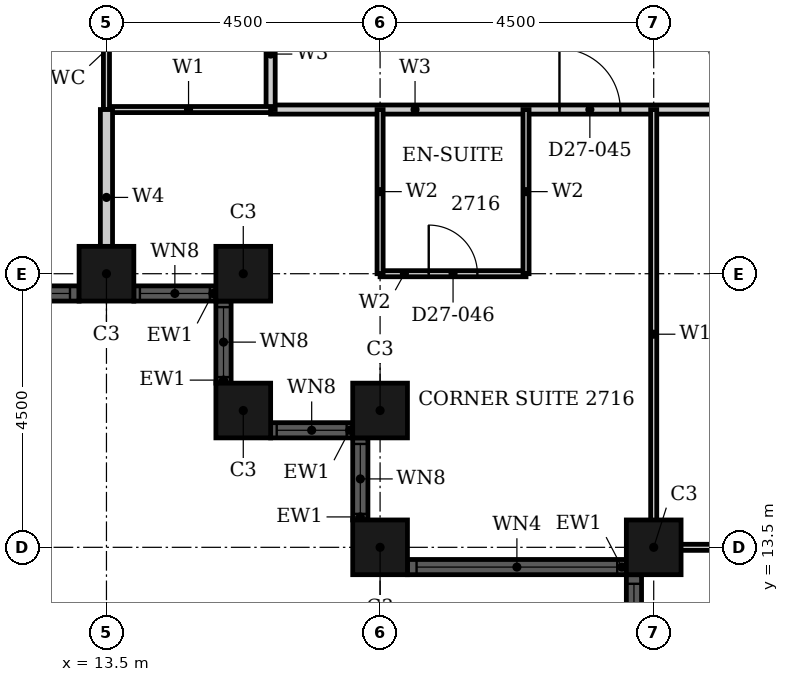
"""IFC4 building model, lengths in metres.
Left out: names, types, materials, properties, quantities, classifications, styles, units other than length and angle.
Written with IfcOpenShell. Run it as: python <this file> out.ifc"""

import sys

from ifc_helpers import new_model, si_unit, direction, frame, frame_2d, origin, origin_2d, place, context, subcontext, project, spatial, rectangle, hollow_rectangle, extrude, element, fill, save


model = new_model("IFC4")
c1 = context("Model", 3, precision=1e-05, world=origin(), true_north=direction((0.0, 1.0)))
c2 = subcontext(c1, "Body", "Model", "MODEL_VIEW")
j1 = project(units=[si_unit("LENGTHUNIT", "METRE"), si_unit("PLANEANGLEUNIT", "RADIAN")], contexts=[c1])
p1 = place(None, origin())
s1 = spatial("IfcSite", under=j1, at=p1, CompositionType="ELEMENT")
p2 = place(p1, origin())
s2 = spatial("IfcBuilding", under=s1, at=p2, CompositionType="ELEMENT")
p3 = place(p2, frame((0.0, 0.0, 111.6)))
s3 = spatial("IfcBuildingStorey", under=s2, at=p3, CompositionType="ELEMENT", Elevation=111.6)
for number, where, z_axis, x_axis in (
    (1, (13.5, 18.0, 0.0), (0.0, 0.0, 1.0), (1.0, 0.0, 0.0)),
    (2, (15.75, 18.0, 0.0), (0.0, 0.0, 1.0), (1.0, 0.0, 0.0)),
    (3, (15.75, 15.75, 0.0), (0.0, 0.0, 1.0), (1.0, 0.0, 0.0)),
    (4, (18.0, 15.75, 0.0), (0.0, 0.0, 1.0), (1.0, 0.0, 0.0)),
    (5, (18.0, 13.5, 0.0), (0.0, 0.0, 1.0), (1.0, 0.0, 0.0)),
    (6, (22.5, 13.5, 0.0), (0.0, 0.0, 1.0), (1.0, 0.0, 0.0)),
):
    element("IfcColumn", number, at=place(p3, frame(where, z_axis=z_axis, x_axis=x_axis)), inside=s3, PredefinedType="COLUMN", context=c2, shape_type="SweptSolid", body=[
        extrude(hollow_rectangle(XDim=0.9, YDim=0.9, WallThickness=0.028, at=origin_2d()), origin(), (0.0, 0.0, 1.0), 3.6),
    ])
p4 = place(p3, frame((4.95, 17.675, 0.0), z_axis=(0.0, 0.0, 1.0), x_axis=(1.0, 0.0, 0.0)))
e7 = element("IfcWall", 7, at=p4, inside=s3, PredefinedType="SOLIDWALL", context=c2, shape_type="SweptSolid", body=[
    extrude(rectangle(XDim=8.1, YDim=0.25, at=frame_2d((4.05, 0.0))), origin(), (0.0, 0.0, 1.0), 3.6),
])
p5 = place(p4, frame((0.15, 0.0, 0.9)))
e8 = element("IfcOpeningElement", 8, at=p5, cuts=e7, PredefinedType="OPENING", context=c2, shape_type="SweptSolid", body=[
    extrude(rectangle(XDim=3.3, YDim=2.08, at=frame_2d((1.65, 1.04))), frame((0.0, 0.135, 0.0), z_axis=(0.0, -1.0, 0.0), x_axis=(1.0, 0.0, 0.0)), (0.0, 0.0, 1.0), 0.27),
])
p6 = place(p4, frame((4.65, 0.0, 0.9)))
e9 = element("IfcOpeningElement", 9, at=p6, cuts=e7, PredefinedType="OPENING", context=c2, shape_type="SweptSolid", body=[
    extrude(rectangle(XDim=3.3, YDim=2.08, at=frame_2d((1.65, 1.04))), frame((0.0, 0.135, 0.0), z_axis=(0.0, -1.0, 0.0), x_axis=(1.0, 0.0, 0.0)), (0.0, 0.0, 1.0), 0.27),
])
p7 = place(p3, frame((13.95, 17.675, 0.0), z_axis=(0.0, 0.0, 1.0), x_axis=(1.0, 0.0, 0.0)))
e10 = element("IfcWall", 10, at=p7, inside=s3, PredefinedType="SOLIDWALL", context=c2, shape_type="SweptSolid", body=[
    extrude(rectangle(XDim=1.35, YDim=0.25, at=frame_2d((0.675, 0.0))), origin(), (0.0, 0.0, 1.0), 3.6),
])
p8 = place(p7, frame((0.1, 0.0, 0.9)))
e11 = element("IfcOpeningElement", 11, at=p8, cuts=e10, PredefinedType="OPENING", context=c2, shape_type="SweptSolid", body=[
    extrude(rectangle(XDim=1.15, YDim=2.08, at=frame_2d((0.575, 1.04))), frame((0.0, 0.135, 0.0), z_axis=(0.0, -1.0, 0.0), x_axis=(1.0, 0.0, 0.0)), (0.0, 0.0, 1.0), 0.27),
])
p9 = place(p3, frame((15.425, 17.55, 0.0), z_axis=(0.0, 0.0, 1.0), x_axis=(0.0, -1.0, 0.0)))
e12 = element("IfcWall", 12, at=p9, inside=s3, PredefinedType="SOLIDWALL", context=c2, shape_type="SweptSolid", body=[
    extrude(rectangle(XDim=1.35, YDim=0.25, at=frame_2d((0.675, 0.0))), origin(), (0.0, 0.0, 1.0), 3.6),
])
p10 = place(p9, frame((0.1, 0.0, 0.9)))
e13 = element("IfcOpeningElement", 13, at=p10, cuts=e12, PredefinedType="OPENING", context=c2, shape_type="SweptSolid", body=[
    extrude(rectangle(XDim=1.15, YDim=2.08, at=frame_2d((0.575, 1.04))), frame((0.0, 0.135, 0.0), z_axis=(0.0, -1.0, 0.0), x_axis=(1.0, 0.0, 0.0)), (0.0, 0.0, 1.0), 0.27),
])
p11 = place(p3, frame((16.2, 15.425, 0.0), z_axis=(0.0, 0.0, 1.0), x_axis=(1.0, 0.0, 0.0)))
e14 = element("IfcWall", 14, at=p11, inside=s3, PredefinedType="SOLIDWALL", context=c2, shape_type="SweptSolid", body=[
    extrude(rectangle(XDim=1.35, YDim=0.25, at=frame_2d((0.675, 0.0))), origin(), (0.0, 0.0, 1.0), 3.6),
])
p12 = place(p11, frame((0.1, 0.0, 0.9)))
e15 = element("IfcOpeningElement", 15, at=p12, cuts=e14, PredefinedType="OPENING", context=c2, shape_type="SweptSolid", body=[
    extrude(rectangle(XDim=1.15, YDim=2.08, at=frame_2d((0.575, 1.04))), frame((0.0, 0.135, 0.0), z_axis=(0.0, -1.0, 0.0), x_axis=(1.0, 0.0, 0.0)), (0.0, 0.0, 1.0), 0.27),
])
p13 = place(p3, frame((17.675, 15.3, 0.0), z_axis=(0.0, 0.0, 1.0), x_axis=(0.0, -1.0, 0.0)))
e16 = element("IfcWall", 16, at=p13, inside=s3, PredefinedType="SOLIDWALL", context=c2, shape_type="SweptSolid", body=[
    extrude(rectangle(XDim=1.35, YDim=0.25, at=frame_2d((0.675, 0.0))), origin(), (0.0, 0.0, 1.0), 3.6),
])
p14 = place(p13, frame((0.1, 0.0, 0.9)))
e17 = element("IfcOpeningElement", 17, at=p14, cuts=e16, PredefinedType="OPENING", context=c2, shape_type="SweptSolid", body=[
    extrude(rectangle(XDim=1.15, YDim=2.08, at=frame_2d((0.575, 1.04))), frame((0.0, 0.135, 0.0), z_axis=(0.0, -1.0, 0.0), x_axis=(1.0, 0.0, 0.0)), (0.0, 0.0, 1.0), 0.27),
])
p15 = place(p3, frame((18.45, 13.175, 0.0), z_axis=(0.0, 0.0, 1.0), x_axis=(1.0, 0.0, 0.0)))
e18 = element("IfcWall", 18, at=p15, inside=s3, PredefinedType="SOLIDWALL", context=c2, shape_type="SweptSolid", body=[
    extrude(rectangle(XDim=3.6, YDim=0.25, at=frame_2d((1.8, 0.0))), origin(), (0.0, 0.0, 1.0), 3.6),
])
p16 = place(p15, frame((0.15, 0.0, 0.9)))
e19 = element("IfcOpeningElement", 19, at=p16, cuts=e18, PredefinedType="OPENING", context=c2, shape_type="SweptSolid", body=[
    extrude(rectangle(XDim=3.3, YDim=2.08, at=frame_2d((1.65, 1.04))), frame((0.0, 0.135, 0.0), z_axis=(0.0, -1.0, 0.0), x_axis=(1.0, 0.0, 0.0)), (0.0, 0.0, 1.0), 0.27),
])
p17 = place(p3, frame((22.175, 13.05, 0.0), z_axis=(0.0, 0.0, 1.0), x_axis=(0.0, -1.0, 0.0)))
e20 = element("IfcWall", 20, at=p17, inside=s3, PredefinedType="SOLIDWALL", context=c2, shape_type="SweptSolid", body=[
    extrude(rectangle(XDim=8.1, YDim=0.25, at=frame_2d((4.05, 0.0))), origin(), (0.0, 0.0, 1.0), 3.6),
])
p18 = place(p17, frame((0.15, 0.0, 0.9)))
e21 = element("IfcOpeningElement", 21, at=p18, cuts=e20, PredefinedType="OPENING", context=c2, shape_type="SweptSolid", body=[
    extrude(rectangle(XDim=3.3, YDim=2.08, at=frame_2d((1.65, 1.04))), frame((0.0, 0.135, 0.0), z_axis=(0.0, -1.0, 0.0), x_axis=(1.0, 0.0, 0.0)), (0.0, 0.0, 1.0), 0.27),
])
p19 = place(p17, frame((4.65, 0.0, 0.9)))
e22 = element("IfcOpeningElement", 22, at=p19, cuts=e20, PredefinedType="OPENING", context=c2, shape_type="SweptSolid", body=[
    extrude(rectangle(XDim=3.3, YDim=2.08, at=frame_2d((1.65, 1.04))), frame((0.0, 0.135, 0.0), z_axis=(0.0, -1.0, 0.0), x_axis=(1.0, 0.0, 0.0)), (0.0, 0.0, 1.0), 0.27),
])
p20 = place(p3, frame((16.2, 20.7, 0.0), z_axis=(0.0, 0.0, 1.0), x_axis=(1.0, 0.0, 0.0)))
e23 = element("IfcWall", 23, at=p20, inside=s3, PredefinedType="PARTITIONING", context=c2, shape_type="SweptSolid", body=[
    extrude(rectangle(XDim=13.5, YDim=0.15, at=frame_2d((6.75, 0.0))), origin(), (0.0, 0.0, 1.0), 3.3),
])
p21 = place(p20, frame((4.75, 0.0, 0.0)))
e24 = element("IfcOpeningElement", 24, at=p21, cuts=e23, PredefinedType="OPENING", context=c2, shape_type="SweptSolid", body=[
    extrude(rectangle(XDim=1.0, YDim=2.1, at=frame_2d((0.5, 1.05))), frame((0.0, 0.085, 0.0), z_axis=(0.0, -1.0, 0.0), x_axis=(1.0, 0.0, 0.0)), (0.0, 0.0, 1.0), 0.17),
])
p22 = place(p20, frame((9.45, 0.0, 0.0)))
e25 = element("IfcOpeningElement", 25, at=p22, cuts=e23, PredefinedType="OPENING", context=c2, shape_type="SweptSolid", body=[
    extrude(rectangle(XDim=0.9, YDim=2.1, at=frame_2d((0.45, 1.05))), frame((0.0, 0.085, 0.0), z_axis=(0.0, -1.0, 0.0), x_axis=(1.0, 0.0, 0.0)), (0.0, 0.0, 1.0), 0.17),
])
p23 = place(p3, frame((16.2, 20.7, 0.0), z_axis=(0.0, 0.0, 1.0), x_axis=(0.0, 1.0, 0.0)))
e26 = element("IfcWall", 26, at=p23, inside=s3, PredefinedType="PARTITIONING", context=c2, shape_type="SweptSolid", body=[
    extrude(rectangle(XDim=4.5, YDim=0.15, at=frame_2d((2.25, 0.0))), origin(), (0.0, 0.0, 1.0), 3.3),
])
p24 = place(p23, frame((1.825, 0.0, 0.0)))
e27 = element("IfcOpeningElement", 27, at=p24, cuts=e26, PredefinedType="OPENING", context=c2, shape_type="SweptSolid", body=[
    extrude(rectangle(XDim=0.95, YDim=2.1, at=frame_2d((0.475, 1.05))), frame((0.0, 0.085, 0.0), z_axis=(0.0, -1.0, 0.0), x_axis=(1.0, 0.0, 0.0)), (0.0, 0.0, 1.0), 0.17),
])
p25 = place(p3, frame((22.31, 13.5, 0.0), z_axis=(0.0, 0.0, 1.0), x_axis=(1.0, 0.0, 0.0)))
e28 = element("IfcWall", 28, at=p25, inside=s3, PredefinedType="PARTITIONING", context=c2, shape_type="SweptSolid", body=[
    extrude(rectangle(XDim=7.39, YDim=0.1, at=frame_2d((3.695, 0.0))), origin(), (0.0, 0.0, 1.0), 2.38),
])
p26 = place(p3, frame((13.5, 20.7, 0.0), z_axis=(0.0, 0.0, 1.0), x_axis=(1.0, 0.0, 0.0)))
e29 = element("IfcWall", 29, at=p26, inside=s3, PredefinedType="PARTITIONING", context=c2, shape_type="SweptSolid", body=[
    extrude(rectangle(XDim=2.7, YDim=0.1, at=frame_2d((1.35, 0.0))), origin(), (0.0, 0.0, 1.0), 3.3),
])
p27 = place(p3, frame((13.5, 20.7, 0.0), z_axis=(0.0, 0.0, 1.0), x_axis=(0.0, 1.0, 0.0)))
e30 = element("IfcWall", 30, at=p27, inside=s3, PredefinedType="PARTITIONING", context=c2, shape_type="SweptSolid", body=[
    extrude(rectangle(XDim=4.5, YDim=0.1, at=frame_2d((2.25, 0.0))), origin(), (0.0, 0.0, 1.0), 2.38),
])
p28 = place(p3, frame((22.5, 13.31, 0.0), z_axis=(0.0, 0.0, 1.0), x_axis=(0.0, 1.0, 0.0)))
e31 = element("IfcWall", 31, at=p28, inside=s3, PredefinedType="PARTITIONING", context=c2, shape_type="SweptSolid", body=[
    extrude(rectangle(XDim=7.39, YDim=0.1, at=frame_2d((3.695, 0.0))), origin(), (0.0, 0.0, 1.0), 3.3),
])
p29 = place(p3, frame((13.5, 17.81, 0.0), z_axis=(0.0, 0.0, 1.0), x_axis=(0.0, 1.0, 0.0)))
e32 = element("IfcWall", 32, at=p29, inside=s3, PredefinedType="PARTITIONING", context=c2, shape_type="SweptSolid", body=[
    extrude(rectangle(XDim=2.89, YDim=0.2, at=frame_2d((1.445, 0.0))), origin(), (0.0, 0.0, 1.0), 2.38),
])
p30 = place(p3, frame((18.0, 18.0, 0.0), z_axis=(0.0, 0.0, 1.0), x_axis=(1.0, 0.0, 0.0)))
e33 = element("IfcWall", 33, at=p30, inside=s3, PredefinedType="PARTITIONING", context=c2, shape_type="SweptSolid", body=[
    extrude(rectangle(XDim=2.4, YDim=0.1, at=frame_2d((1.2, 0.0))), origin(), (0.0, 0.0, 1.0), 3.3),
])
p31 = place(p30, frame((0.8, 0.0, 0.0)))
e34 = element("IfcOpeningElement", 34, at=p31, cuts=e33, PredefinedType="OPENING", context=c2, shape_type="SweptSolid", body=[
    extrude(rectangle(XDim=0.8, YDim=2.1, at=frame_2d((0.4, 1.05))), frame((0.0, 0.06, 0.0), z_axis=(0.0, -1.0, 0.0), x_axis=(1.0, 0.0, 0.0)), (0.0, 0.0, 1.0), 0.12),
])
for number, where, z_axis, x_axis in (
    (35, (18.0, 18.0, 0.0), (0.0, 0.0, 1.0), (0.0, 1.0, 0.0)),
    (36, (20.4, 18.0, 0.0), (0.0, 0.0, 1.0), (0.0, 1.0, 0.0)),
):
    element("IfcWall", number, at=place(p3, frame(where, z_axis=z_axis, x_axis=x_axis)), inside=s3, PredefinedType="PARTITIONING", context=c2, shape_type="SweptSolid", body=[
        extrude(rectangle(XDim=2.7, YDim=0.1, at=frame_2d((1.35, 0.0))), origin(), (0.0, 0.0, 1.0), 3.3),
    ])
p32 = place(p6, origin())
e37 = element("IfcWindow", 37, at=p32, inside=s3, PartitioningType="SINGLE_PANEL", PredefinedType="WINDOW", context=c2, shape_type="SweptSolid", body=[
    extrude(rectangle(XDim=3.3, YDim=2.08, at=frame_2d((1.65, 1.04))), frame((0.0, 0.03, 0.0), z_axis=(0.0, -1.0, 0.0), x_axis=(1.0, 0.0, 0.0)), (0.0, 0.0, 1.0), 0.06),
])
fill(e9, e37)
p33 = place(p8, origin())
e38 = element("IfcWindow", 38, at=p33, inside=s3, PartitioningType="SINGLE_PANEL", PredefinedType="WINDOW", context=c2, shape_type="SweptSolid", body=[
    extrude(rectangle(XDim=1.15, YDim=2.08, at=frame_2d((0.575, 1.04))), frame((0.0, 0.03, 0.0), z_axis=(0.0, -1.0, 0.0), x_axis=(1.0, 0.0, 0.0)), (0.0, 0.0, 1.0), 0.06),
])
fill(e11, e38)
p34 = place(p10, origin())
e39 = element("IfcWindow", 39, at=p34, inside=s3, PartitioningType="SINGLE_PANEL", PredefinedType="WINDOW", context=c2, shape_type="SweptSolid", body=[
    extrude(rectangle(XDim=1.15, YDim=2.08, at=frame_2d((0.575, 1.04))), frame((0.0, 0.03, 0.0), z_axis=(0.0, -1.0, 0.0), x_axis=(1.0, 0.0, 0.0)), (0.0, 0.0, 1.0), 0.06),
])
fill(e13, e39)
p35 = place(p12, origin())
e40 = element("IfcWindow", 40, at=p35, inside=s3, PartitioningType="SINGLE_PANEL", PredefinedType="WINDOW", context=c2, shape_type="SweptSolid", body=[
    extrude(rectangle(XDim=1.15, YDim=2.08, at=frame_2d((0.575, 1.04))), frame((0.0, 0.03, 0.0), z_axis=(0.0, -1.0, 0.0), x_axis=(1.0, 0.0, 0.0)), (0.0, 0.0, 1.0), 0.06),
])
fill(e15, e40)
p36 = place(p14, origin())
e41 = element("IfcWindow", 41, at=p36, inside=s3, PartitioningType="SINGLE_PANEL", PredefinedType="WINDOW", context=c2, shape_type="SweptSolid", body=[
    extrude(rectangle(XDim=1.15, YDim=2.08, at=frame_2d((0.575, 1.04))), frame((0.0, 0.03, 0.0), z_axis=(0.0, -1.0, 0.0), x_axis=(1.0, 0.0, 0.0)), (0.0, 0.0, 1.0), 0.06),
])
fill(e17, e41)
p37 = place(p16, origin())
e42 = element("IfcWindow", 42, at=p37, inside=s3, PartitioningType="SINGLE_PANEL", PredefinedType="WINDOW", context=c2, shape_type="SweptSolid", body=[
    extrude(rectangle(XDim=3.3, YDim=2.08, at=frame_2d((1.65, 1.04))), frame((0.0, 0.03, 0.0), z_axis=(0.0, -1.0, 0.0), x_axis=(1.0, 0.0, 0.0)), (0.0, 0.0, 1.0), 0.06),
])
fill(e19, e42)
p38 = place(p18, origin())
e43 = element("IfcWindow", 43, at=p38, inside=s3, PartitioningType="SINGLE_PANEL", PredefinedType="WINDOW", context=c2, shape_type="SweptSolid", body=[
    extrude(rectangle(XDim=3.3, YDim=2.08, at=frame_2d((1.65, 1.04))), frame((0.0, 0.03, 0.0), z_axis=(0.0, -1.0, 0.0), x_axis=(1.0, 0.0, 0.0)), (0.0, 0.0, 1.0), 0.06),
])
fill(e21, e43)
p39 = place(p21, origin())
e44 = element("IfcDoor", 44, at=p39, inside=s3, OperationType="SINGLE_SWING_RIGHT", PredefinedType="DOOR", context=c2, shape_type="SweptSolid", body=[
    extrude(rectangle(XDim=1.0, YDim=2.1, at=frame_2d((0.5, 1.05))), frame((0.0, 0.025, 0.0), z_axis=(0.0, -1.0, 0.0), x_axis=(1.0, 0.0, 0.0)), (0.0, 0.0, 1.0), 0.05),
])
fill(e24, e44)
p40 = place(p31, origin())
e45 = element("IfcDoor", 45, at=p40, inside=s3, OperationType="SINGLE_SWING_LEFT", PredefinedType="DOOR", context=c2, shape_type="SweptSolid", body=[
    extrude(rectangle(XDim=0.8, YDim=2.1, at=frame_2d((0.4, 1.05))), frame((0.0, 0.025, 0.0), z_axis=(0.0, -1.0, 0.0), x_axis=(1.0, 0.0, 0.0)), (0.0, 0.0, 1.0), 0.05),
])
fill(e34, e45)
save(model, sys.argv[1])
